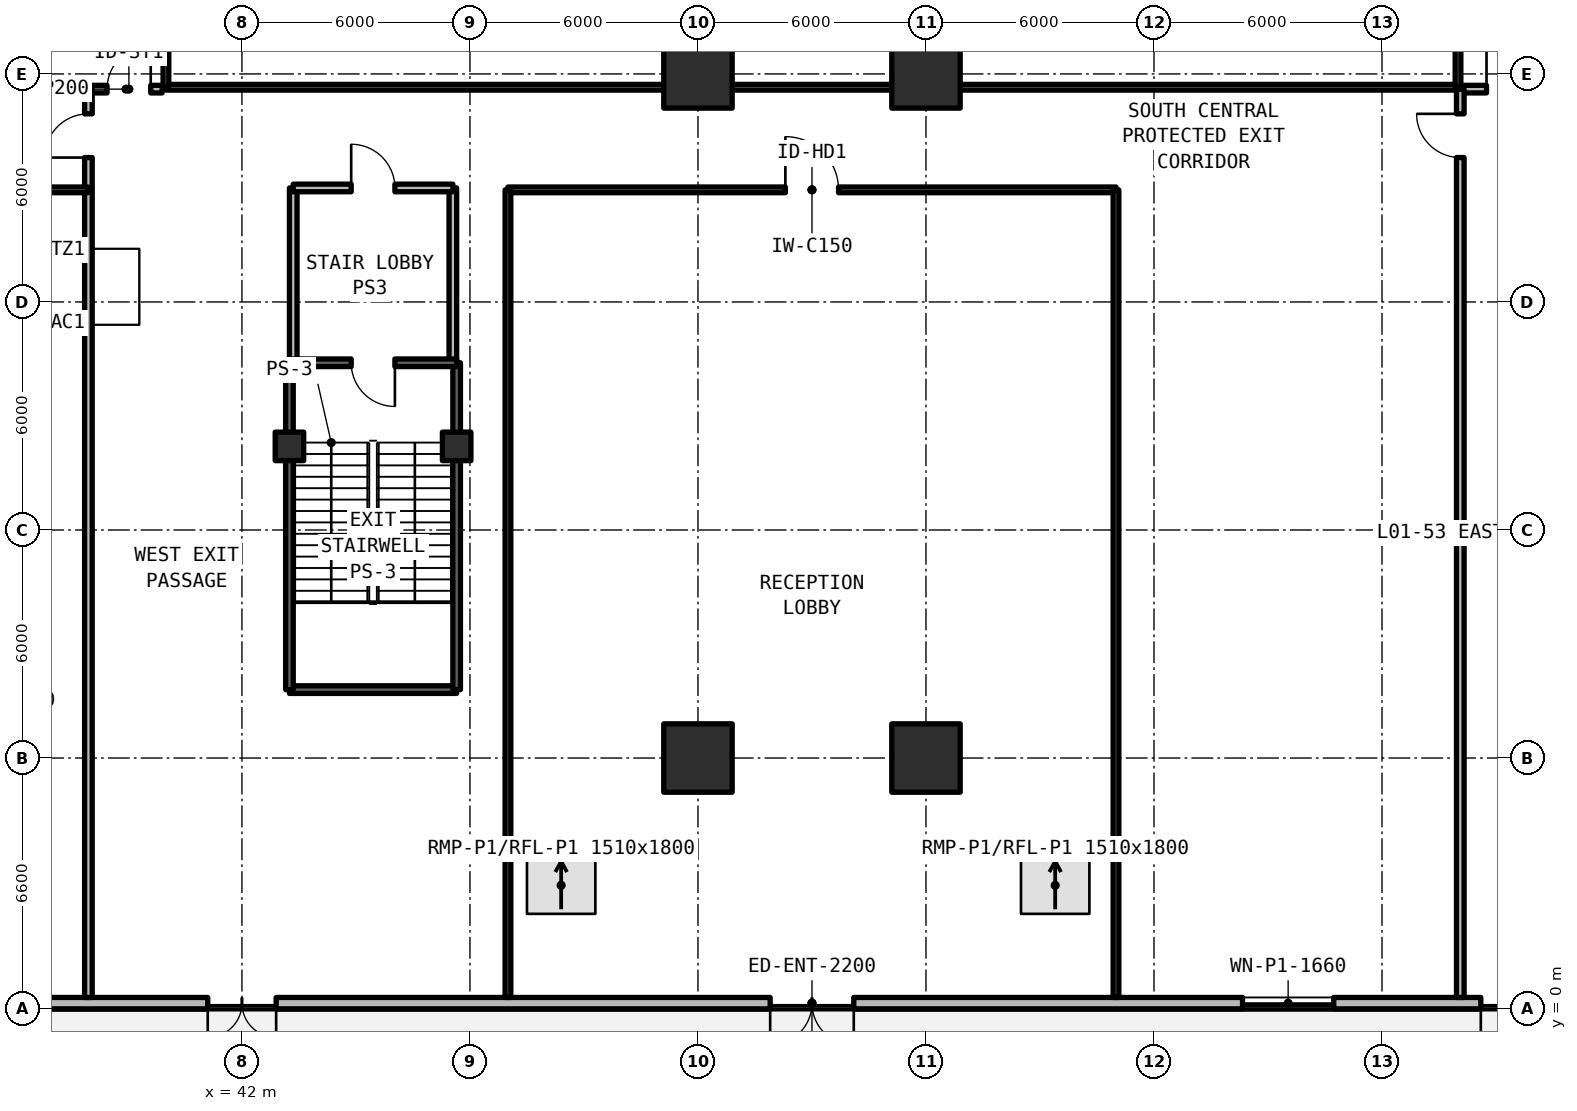
"""IFC4 building model, lengths in metres.
Left out: names, types, materials, properties, quantities, classifications, styles, units other than length and angle.
Written with IfcOpenShell. Run it as: python <this file> out.ifc"""

import sys

from ifc_helpers import new_model, si_unit, direction, frame, frame_2d, origin, origin_2d, place, context, subcontext, project, spatial, rectangle, extrude, element, fill, save


model = new_model("IFC4")
c1 = context("Model", 3, precision=1e-05, world=origin(), true_north=direction((0.0, 1.0)))
c2 = subcontext(c1, "Body", "Model", "MODEL_VIEW")
j1 = project(units=[si_unit("LENGTHUNIT", "METRE"), si_unit("PLANEANGLEUNIT", "RADIAN")], contexts=[c1])
p1 = place(None, origin())
s1 = spatial("IfcSite", under=j1, at=p1, CompositionType="ELEMENT")
p2 = place(p1, origin())
s2 = spatial("IfcBuilding", under=s1, at=p2, CompositionType="ELEMENT")
p3 = place(p2, origin())
s3 = spatial("IfcBuildingStorey", under=s2, at=p3, CompositionType="ELEMENT", Elevation=0.0)
for number, where, z_axis, x_axis in (
    (1, (54.0, 6.6, 0.0), (0.0, 0.0, 1.0), (1.0, 0.0, 0.0)),
    (2, (54.0, 24.6, 0.0), (0.0, 0.0, 1.0), (1.0, 0.0, 0.0)),
    (3, (60.0, 6.6, 0.0), (0.0, 0.0, 1.0), (1.0, 0.0, 0.0)),
    (4, (60.0, 24.6, 0.0), (0.0, 0.0, 1.0), (1.0, 0.0, 0.0)),
):
    element("IfcColumn", number, at=place(p3, frame(where, z_axis=z_axis, x_axis=x_axis)), inside=s3, PredefinedType="COLUMN", context=c2, shape_type="SweptSolid", body=[
        extrude(rectangle(XDim=1.8, YDim=1.8, at=origin_2d()), origin(), (0.0, 0.0, 1.0), 4.95),
    ])
for number, where, z_axis, x_axis in (
    (5, (43.25, 14.8, 0.0), (0.0, 0.0, 1.0), (1.0, 0.0, 0.0)),
    (6, (47.65, 14.8, 0.0), (0.0, 0.0, 1.0), (1.0, 0.0, 0.0)),
):
    element("IfcColumn", number, at=place(p3, frame(where, z_axis=z_axis, x_axis=x_axis)), inside=s3, PredefinedType="COLUMN", context=c2, shape_type="SweptSolid", body=[
        extrude(rectangle(XDim=0.75, YDim=0.75, at=origin_2d()), origin(), (0.0, 0.0, 1.0), 4.95),
    ])
p4 = place(p3, frame((0.15, 0.15, 0.0), z_axis=(0.0, 0.0, 1.0), x_axis=(1.0, 0.0, 0.0)))
e7 = element("IfcWall", 7, at=p4, inside=s3, PredefinedType="SOLIDWALL", context=c2, shape_type="SweptSolid", body=[
    extrude(rectangle(XDim=113.7, YDim=0.3, at=frame_2d((56.85, 0.0))), origin(), (0.0, 0.0, 1.0), 4.67),
])
p5 = place(p4, frame((5.75, 0.0, 0.0)))
e8 = element("IfcOpeningElement", 8, at=p5, cuts=e7, PredefinedType="OPENING", context=c2, shape_type="SweptSolid", body=[
    extrude(rectangle(XDim=1.2, YDim=2.2, at=frame_2d((0.6, 1.1))), frame((0.0, 0.16, 0.0), z_axis=(0.0, -1.0, 0.0), x_axis=(1.0, 0.0, 0.0)), (0.0, 0.0, 1.0), 0.32),
])
p6 = place(p4, frame((17.05, 0.0, 0.0)))
e9 = element("IfcOpeningElement", 9, at=p6, cuts=e7, PredefinedType="OPENING", context=c2, shape_type="SweptSolid", body=[
    extrude(rectangle(XDim=4.2, YDim=3.2, at=frame_2d((2.1, 1.6))), frame((0.0, 0.16, 0.0), z_axis=(0.0, -1.0, 0.0), x_axis=(1.0, 0.0, 0.0)), (0.0, 0.0, 1.0), 0.32),
])
p7 = place(p4, frame((30.7, 0.0, 0.0)))
e10 = element("IfcOpeningElement", 10, at=p7, cuts=e7, PredefinedType="OPENING", context=c2, shape_type="SweptSolid", body=[
    extrude(rectangle(XDim=1.8, YDim=2.25, at=frame_2d((0.9, 1.125))), frame((0.0, 0.16, 0.0), z_axis=(0.0, -1.0, 0.0), x_axis=(1.0, 0.0, 0.0)), (0.0, 0.0, 1.0), 0.32),
])
p8 = place(p4, frame((40.95, 0.0, 0.0)))
e11 = element("IfcOpeningElement", 11, at=p8, cuts=e7, PredefinedType="OPENING", context=c2, shape_type="SweptSolid", body=[
    extrude(rectangle(XDim=1.8, YDim=2.25, at=frame_2d((0.9, 1.125))), frame((0.0, 0.16, 0.0), z_axis=(0.0, -1.0, 0.0), x_axis=(1.0, 0.0, 0.0)), (0.0, 0.0, 1.0), 0.32),
])
p9 = place(p4, frame((55.75, 0.0, 0.0)))
e12 = element("IfcOpeningElement", 12, at=p9, cuts=e7, PredefinedType="OPENING", context=c2, shape_type="SweptSolid", body=[
    extrude(rectangle(XDim=2.2, YDim=2.6, at=frame_2d((1.1, 1.3))), frame((0.0, 0.16, 0.0), z_axis=(0.0, -1.0, 0.0), x_axis=(1.0, 0.0, 0.0)), (0.0, 0.0, 1.0), 0.32),
])
p10 = place(p4, frame((74.45, 0.0, 0.0)))
e13 = element("IfcOpeningElement", 13, at=p10, cuts=e7, PredefinedType="OPENING", context=c2, shape_type="SweptSolid", body=[
    extrude(rectangle(XDim=1.8, YDim=2.25, at=frame_2d((0.9, 1.125))), frame((0.0, 0.16, 0.0), z_axis=(0.0, -1.0, 0.0), x_axis=(1.0, 0.0, 0.0)), (0.0, 0.0, 1.0), 0.32),
])
p11 = place(p4, frame((106.25, 0.0, 0.0)))
e14 = element("IfcOpeningElement", 14, at=p11, cuts=e7, PredefinedType="OPENING", context=c2, shape_type="SweptSolid", body=[
    extrude(rectangle(XDim=1.2, YDim=2.2, at=frame_2d((0.6, 1.1))), frame((0.0, 0.16, 0.0), z_axis=(0.0, -1.0, 0.0), x_axis=(1.0, 0.0, 0.0)), (0.0, 0.0, 1.0), 0.32),
])
p12 = place(p4, frame((68.18, 0.0, 0.78)))
e15 = element("IfcOpeningElement", 15, at=p12, cuts=e7, PredefinedType="OPENING", context=c2, shape_type="SweptSolid", body=[
    extrude(rectangle(XDim=2.4, YDim=1.66, at=frame_2d((1.2, 0.83))), frame((0.0, 0.16, 0.0), z_axis=(0.0, -1.0, 0.0), x_axis=(1.0, 0.0, 0.0)), (0.0, 0.0, 1.0), 0.32),
])
p13 = place(p4, frame((8.15, 0.0, 0.78)))
e16 = element("IfcOpeningElement", 16, at=p13, cuts=e7, PredefinedType="OPENING", context=c2, shape_type="SweptSolid", body=[
    extrude(rectangle(XDim=2.4, YDim=1.66, at=frame_2d((1.2, 0.83))), frame((0.0, 0.16, 0.0), z_axis=(0.0, -1.0, 0.0), x_axis=(1.0, 0.0, 0.0)), (0.0, 0.0, 1.0), 0.32),
])
p14 = place(p4, frame((84.15, 0.0, 0.78)))
e17 = element("IfcOpeningElement", 17, at=p14, cuts=e7, PredefinedType="OPENING", context=c2, shape_type="SweptSolid", body=[
    extrude(rectangle(XDim=2.4, YDim=1.66, at=frame_2d((1.2, 0.83))), frame((0.0, 0.16, 0.0), z_axis=(0.0, -1.0, 0.0), x_axis=(1.0, 0.0, 0.0)), (0.0, 0.0, 1.0), 0.32),
])
p15 = place(p4, frame((93.65, 0.0, 0.78)))
e18 = element("IfcOpeningElement", 18, at=p15, cuts=e7, PredefinedType="OPENING", context=c2, shape_type="SweptSolid", body=[
    extrude(rectangle(XDim=2.4, YDim=1.66, at=frame_2d((1.2, 0.83))), frame((0.0, 0.16, 0.0), z_axis=(0.0, -1.0, 0.0), x_axis=(1.0, 0.0, 0.0)), (0.0, 0.0, 1.0), 0.32),
])
p16 = place(p4, frame((103.15, 0.0, 0.78)))
e19 = element("IfcOpeningElement", 19, at=p16, cuts=e7, PredefinedType="OPENING", context=c2, shape_type="SweptSolid", body=[
    extrude(rectangle(XDim=2.4, YDim=1.66, at=frame_2d((1.2, 0.83))), frame((0.0, 0.16, 0.0), z_axis=(0.0, -1.0, 0.0), x_axis=(1.0, 0.0, 0.0)), (0.0, 0.0, 1.0), 0.32),
])
p17 = place(p3, frame((38.0, 24.2, 0.0), z_axis=(0.0, 0.0, 1.0), x_axis=(1.0, 0.0, 0.0)))
e20 = element("IfcWall", 20, at=p17, inside=s3, PredefinedType="SOLIDWALL", context=c2, shape_type="SweptSolid", body=[
    extrude(rectangle(XDim=1.9, YDim=0.2, at=frame_2d((0.95, 0.0))), origin(), (0.0, 0.0, 1.0), 3.89),
])
p18 = place(p17, frame((0.45, 0.0, 0.0)))
e21 = element("IfcOpeningElement", 21, at=p18, cuts=e20, PredefinedType="OPENING", context=c2, shape_type="SweptSolid", body=[
    extrude(rectangle(XDim=1.15, YDim=2.15, at=frame_2d((0.575, 1.075))), frame((0.0, 0.11, 0.0), z_axis=(0.0, -1.0, 0.0), x_axis=(1.0, 0.0, 0.0)), (0.0, 0.0, 1.0), 0.22),
])
p19 = place(p3, frame((74.1, 24.2, 0.0), z_axis=(0.0, 0.0, 1.0), x_axis=(1.0, 0.0, 0.0)))
e22 = element("IfcWall", 22, at=p19, inside=s3, PredefinedType="SOLIDWALL", context=c2, shape_type="SweptSolid", body=[
    extrude(rectangle(XDim=2.85, YDim=0.2, at=frame_2d((1.425, 0.0))), origin(), (0.0, 0.0, 1.0), 3.89),
])
p20 = place(p19, frame((0.65, 0.0, 0.0)))
e23 = element("IfcOpeningElement", 23, at=p20, cuts=e22, PredefinedType="OPENING", context=c2, shape_type="SweptSolid", body=[
    extrude(rectangle(XDim=1.15, YDim=2.15, at=frame_2d((0.575, 1.075))), frame((0.0, 0.11, 0.0), z_axis=(0.0, -1.0, 0.0), x_axis=(1.0, 0.0, 0.0)), (0.0, 0.0, 1.0), 0.22),
])
for number, where, z_axis, x_axis in (
    (24, (43.35, 17.0, 0.0), (0.0, 0.0, 1.0), (0.0, 1.0, 0.0)),
    (25, (47.55, 17.0, 0.0), (0.0, 0.0, 1.0), (0.0, 1.0, 0.0)),
):
    element("IfcWall", number, at=place(p3, frame(where, z_axis=z_axis, x_axis=x_axis)), inside=s3, PredefinedType="SOLIDWALL", context=c2, shape_type="SweptSolid", body=[
        extrude(rectangle(XDim=4.6, YDim=0.2, at=frame_2d((2.3, 0.0))), origin(), (0.0, 0.0, 1.0), 3.89),
    ])
p21 = place(p3, frame((43.35, 21.6, 0.0), z_axis=(0.0, 0.0, 1.0), x_axis=(1.0, 0.0, 0.0)))
e26 = element("IfcWall", 26, at=p21, inside=s3, PredefinedType="SOLIDWALL", context=c2, shape_type="SweptSolid", body=[
    extrude(rectangle(XDim=4.2, YDim=0.2, at=frame_2d((2.1, 0.0))), origin(), (0.0, 0.0, 1.0), 3.89),
])
p22 = place(p21, frame((1.525, 0.0, 0.0)))
e27 = element("IfcOpeningElement", 27, at=p22, cuts=e26, PredefinedType="OPENING", context=c2, shape_type="SweptSolid", body=[
    extrude(rectangle(XDim=1.15, YDim=2.15, at=frame_2d((0.575, 1.075))), frame((0.0, 0.11, 0.0), z_axis=(0.0, -1.0, 0.0), x_axis=(1.0, 0.0, 0.0)), (0.0, 0.0, 1.0), 0.22),
])
p23 = place(p3, frame((49.0, 21.55, 0.0), z_axis=(0.0, 0.0, 1.0), x_axis=(1.0, 0.0, 0.0)))
e28 = element("IfcWall", 28, at=p23, inside=s3, PredefinedType="SOLIDWALL", context=c2, shape_type="SweptSolid", body=[
    extrude(rectangle(XDim=16.0, YDim=0.15, at=frame_2d((8.0, 0.0))), origin(), (0.0, 0.0, 1.0), 3.89),
])
p24 = place(p23, frame((7.3, 0.0, 0.0)))
e29 = element("IfcOpeningElement", 29, at=p24, cuts=e28, PredefinedType="OPENING", context=c2, shape_type="SweptSolid", body=[
    extrude(rectangle(XDim=1.4, YDim=2.15, at=frame_2d((0.7, 1.075))), frame((0.0, 0.085, 0.0), z_axis=(0.0, -1.0, 0.0), x_axis=(1.0, 0.0, 0.0)), (0.0, 0.0, 1.0), 0.17),
])
for number, where, z_axis, x_axis in (
    (30, (49.0, 0.3, 0.0), (0.0, 0.0, 1.0), (0.0, 1.0, 0.0)),
    (31, (65.0, 0.3, 0.0), (0.0, 0.0, 1.0), (0.0, 1.0, 0.0)),
):
    element("IfcWall", number, at=place(p3, frame(where, z_axis=z_axis, x_axis=x_axis)), inside=s3, PredefinedType="SOLIDWALL", context=c2, shape_type="SweptSolid", body=[
        extrude(rectangle(XDim=21.25, YDim=0.15, at=frame_2d((10.625, 0.0))), origin(), (0.0, 0.0, 1.0), 3.89),
    ])
p25 = place(p3, frame((37.96, 0.3, 0.0), z_axis=(0.0, 0.0, 1.0), x_axis=(0.0, 1.0, 0.0)))
e32 = element("IfcWall", 32, at=p25, inside=s3, PredefinedType="SOLIDWALL", context=c2, shape_type="SweptSolid", body=[
    extrude(rectangle(XDim=23.9, YDim=0.2, at=frame_2d((11.95, 0.0))), origin(), (0.0, 0.0, 1.0), 3.89),
])
p26 = place(p25, frame((22.1, 0.0, 0.0)))
e33 = element("IfcOpeningElement", 33, at=p26, cuts=e32, PredefinedType="OPENING", context=c2, shape_type="SweptSolid", body=[
    extrude(rectangle(XDim=1.15, YDim=2.15, at=frame_2d((0.575, 1.075))), frame((0.0, 0.11, 0.0), z_axis=(0.0, -1.0, 0.0), x_axis=(1.0, 0.0, 0.0)), (0.0, 0.0, 1.0), 0.22),
])
p27 = place(p3, frame((74.06, 0.3, 0.0), z_axis=(0.0, 0.0, 1.0), x_axis=(0.0, 1.0, 0.0)))
e34 = element("IfcWall", 34, at=p27, inside=s3, PredefinedType="SOLIDWALL", context=c2, shape_type="SweptSolid", body=[
    extrude(rectangle(XDim=23.9, YDim=0.2, at=frame_2d((11.95, 0.0))), origin(), (0.0, 0.0, 1.0), 3.89),
])
p28 = place(p27, frame((22.1, 0.0, 0.0)))
e35 = element("IfcOpeningElement", 35, at=p28, cuts=e34, PredefinedType="OPENING", context=c2, shape_type="SweptSolid", body=[
    extrude(rectangle(XDim=1.15, YDim=2.15, at=frame_2d((0.575, 1.075))), frame((0.0, 0.11, 0.0), z_axis=(0.0, -1.0, 0.0), x_axis=(1.0, 0.0, 0.0)), (0.0, 0.0, 1.0), 0.22),
])
p29 = place(p3, frame((40.0, 24.25, 0.0), z_axis=(0.0, 0.0, 1.0), x_axis=(1.0, 0.0, 0.0)))
e36 = element("IfcWall", 36, at=p29, inside=s3, PredefinedType="SOLIDWALL", context=c2, shape_type="SweptSolid", body=[
    extrude(rectangle(XDim=34.0, YDim=0.15, at=frame_2d((17.0, 0.0))), origin(), (0.0, 0.0, 1.0), 3.89),
])
p30 = place(p3, frame((40.0, 24.25, 0.0), z_axis=(0.0, 0.0, 1.0), x_axis=(0.0, 1.0, 0.0)))
e37 = element("IfcWall", 37, at=p30, inside=s3, PredefinedType="SOLIDWALL", context=c2, shape_type="SweptSolid", body=[
    extrude(rectangle(XDim=18.7, YDim=0.15, at=frame_2d((9.35, 0.0))), origin(), (0.0, 0.0, 1.0), 3.89),
])
p31 = place(p30, frame((8.3, 0.0, 0.0)))
e38 = element("IfcOpeningElement", 38, at=p31, cuts=e37, PredefinedType="OPENING", context=c2, shape_type="SweptSolid", body=[
    extrude(rectangle(XDim=1.4, YDim=2.15, at=frame_2d((0.7, 1.075))), frame((0.0, 0.085, 0.0), z_axis=(0.0, -1.0, 0.0), x_axis=(1.0, 0.0, 0.0)), (0.0, 0.0, 1.0), 0.17),
])
p32 = place(p3, frame((74.0, 24.25, 0.0), z_axis=(0.0, 0.0, 1.0), x_axis=(0.0, 1.0, 0.0)))
e39 = element("IfcWall", 39, at=p32, inside=s3, PredefinedType="SOLIDWALL", context=c2, shape_type="SweptSolid", body=[
    extrude(rectangle(XDim=18.7, YDim=0.15, at=frame_2d((9.35, 0.0))), origin(), (0.0, 0.0, 1.0), 3.89),
])
p33 = place(p3, frame((30.15, 21.55, 0.0), z_axis=(0.0, 0.0, 1.0), x_axis=(1.0, 0.0, 0.0)))
e40 = element("IfcWall", 40, at=p33, inside=s3, PredefinedType="SOLIDWALL", context=c2, shape_type="SweptSolid", body=[
    extrude(rectangle(XDim=7.8, YDim=0.15, at=frame_2d((3.9, 0.0))), origin(), (0.0, 0.0, 1.0), 3.89),
])
p34 = place(p33, frame((3.35, 0.0, 0.0)))
e41 = element("IfcOpeningElement", 41, at=p34, cuts=e40, PredefinedType="OPENING", context=c2, shape_type="SweptSolid", body=[
    extrude(rectangle(XDim=1.1, YDim=2.15, at=frame_2d((0.55, 1.075))), frame((0.0, 0.085, 0.0), z_axis=(0.0, -1.0, 0.0), x_axis=(1.0, 0.0, 0.0)), (0.0, 0.0, 1.0), 0.17),
])
p35 = place(p3, frame((43.25, 8.4, 0.0), z_axis=(0.0, 0.0, 1.0), x_axis=(1.0, 0.0, 0.0)))
e42 = element("IfcWall", 42, at=p35, inside=s3, PredefinedType="SOLIDWALL", context=c2, shape_type="SweptSolid", body=[
    extrude(rectangle(XDim=4.4, YDim=0.2, at=frame_2d((2.2, 0.0))), origin(), (0.0, 0.0, 1.0), 4.95),
])
p36 = place(p3, frame((47.65, 8.4, 0.0), z_axis=(0.0, 0.0, 1.0), x_axis=(0.0, 1.0, 0.0)))
e43 = element("IfcWall", 43, at=p36, inside=s3, PredefinedType="SOLIDWALL", context=c2, shape_type="SweptSolid", body=[
    extrude(rectangle(XDim=8.6, YDim=0.2, at=frame_2d((4.3, 0.0))), origin(), (0.0, 0.0, 1.0), 4.95),
])
p37 = place(p3, frame((47.65, 17.0, 0.0), z_axis=(0.0, 0.0, 1.0), x_axis=(-1.0, 0.0, 0.0)))
e44 = element("IfcWall", 44, at=p37, inside=s3, PredefinedType="SOLIDWALL", context=c2, shape_type="SweptSolid", body=[
    extrude(rectangle(XDim=4.4, YDim=0.2, at=frame_2d((2.2, 0.0))), origin(), (0.0, 0.0, 1.0), 4.95),
])
p38 = place(p37, frame((1.625, 0.0, 0.0)))
e45 = element("IfcOpeningElement", 45, at=p38, cuts=e44, PredefinedType="OPENING", context=c2, shape_type="SweptSolid", body=[
    extrude(rectangle(XDim=1.15, YDim=2.15, at=frame_2d((0.575, 1.075))), frame((0.0, 0.11, 0.0), z_axis=(0.0, -1.0, 0.0), x_axis=(1.0, 0.0, 0.0)), (0.0, 0.0, 1.0), 0.22),
])
p39 = place(p3, frame((43.25, 17.0, 0.0), z_axis=(0.0, 0.0, 1.0), x_axis=(0.0, -1.0, 0.0)))
e46 = element("IfcWall", 46, at=p39, inside=s3, PredefinedType="SOLIDWALL", context=c2, shape_type="SweptSolid", body=[
    extrude(rectangle(XDim=8.6, YDim=0.2, at=frame_2d((4.3, 0.0))), origin(), (0.0, 0.0, 1.0), 4.95),
])
p40 = place(p8, frame((1.8, 0.0, 0.0), z_axis=(0.0, 0.0, 1.0), x_axis=(-1.0, 0.0, 0.0)))
e47 = element("IfcDoor", 47, at=p40, inside=s3, OperationType="SINGLE_SWING_LEFT", PredefinedType="DOOR", context=c2, shape_type="SweptSolid", body=[
    extrude(rectangle(XDim=1.8, YDim=2.25, at=frame_2d((0.9, 1.125))), frame((0.0, 0.025, 0.0), z_axis=(0.0, -1.0, 0.0), x_axis=(1.0, 0.0, 0.0)), (0.0, 0.0, 1.0), 0.05),
])
fill(e11, e47)
p41 = place(p9, frame((2.2, 0.0, 0.0), z_axis=(0.0, 0.0, 1.0), x_axis=(-1.0, 0.0, 0.0)))
e48 = element("IfcDoor", 48, at=p41, inside=s3, OperationType="SINGLE_SWING_RIGHT", PredefinedType="DOOR", context=c2, shape_type="SweptSolid", body=[
    extrude(rectangle(XDim=2.2, YDim=2.6, at=frame_2d((1.1, 1.3))), frame((0.0, 0.025, 0.0), z_axis=(0.0, -1.0, 0.0), x_axis=(1.0, 0.0, 0.0)), (0.0, 0.0, 1.0), 0.05),
])
fill(e12, e48)
p42 = place(p10, frame((1.8, 0.0, 0.0), z_axis=(0.0, 0.0, 1.0), x_axis=(-1.0, 0.0, 0.0)))
e49 = element("IfcDoor", 49, at=p42, inside=s3, OperationType="SINGLE_SWING_LEFT", PredefinedType="DOOR", context=c2, shape_type="SweptSolid", body=[
    extrude(rectangle(XDim=1.8, YDim=2.25, at=frame_2d((0.9, 1.125))), frame((0.0, 0.025, 0.0), z_axis=(0.0, -1.0, 0.0), x_axis=(1.0, 0.0, 0.0)), (0.0, 0.0, 1.0), 0.05),
])
fill(e13, e49)
p43 = place(p12, origin())
e50 = element("IfcWindow", 50, at=p43, inside=s3, PartitioningType="SINGLE_PANEL", PredefinedType="WINDOW", context=c2, shape_type="SweptSolid", body=[
    extrude(rectangle(XDim=2.4, YDim=1.66, at=frame_2d((1.2, 0.83))), frame((0.0, 0.03, 0.0), z_axis=(0.0, -1.0, 0.0), x_axis=(1.0, 0.0, 0.0)), (0.0, 0.0, 1.0), 0.06),
])
fill(e15, e50)
p44 = place(p18, frame((1.15, 0.0, 0.0), z_axis=(0.0, 0.0, 1.0), x_axis=(-1.0, 0.0, 0.0)))
e51 = element("IfcDoor", 51, at=p44, inside=s3, OperationType="SINGLE_SWING_RIGHT", PredefinedType="DOOR", context=c2, shape_type="SweptSolid", body=[
    extrude(rectangle(XDim=1.15, YDim=2.15, at=frame_2d((0.575, 1.075))), frame((0.0, 0.025, 0.0), z_axis=(0.0, -1.0, 0.0), x_axis=(1.0, 0.0, 0.0)), (0.0, 0.0, 1.0), 0.05),
])
fill(e21, e51)
p45 = place(p20, frame((1.15, 0.0, 0.0), z_axis=(0.0, 0.0, 1.0), x_axis=(-1.0, 0.0, 0.0)))
e52 = element("IfcDoor", 52, at=p45, inside=s3, OperationType="SINGLE_SWING_LEFT", PredefinedType="DOOR", context=c2, shape_type="SweptSolid", body=[
    extrude(rectangle(XDim=1.15, YDim=2.15, at=frame_2d((0.575, 1.075))), frame((0.0, 0.025, 0.0), z_axis=(0.0, -1.0, 0.0), x_axis=(1.0, 0.0, 0.0)), (0.0, 0.0, 1.0), 0.05),
])
fill(e23, e52)
p46 = place(p22, origin())
e53 = element("IfcDoor", 53, at=p46, inside=s3, OperationType="SINGLE_SWING_LEFT", PredefinedType="DOOR", context=c2, shape_type="SweptSolid", body=[
    extrude(rectangle(XDim=1.15, YDim=2.15, at=frame_2d((0.575, 1.075))), frame((0.0, 0.025, 0.0), z_axis=(0.0, -1.0, 0.0), x_axis=(1.0, 0.0, 0.0)), (0.0, 0.0, 1.0), 0.05),
])
fill(e27, e53)
p47 = place(p24, frame((1.4, 0.0, 0.0), z_axis=(0.0, 0.0, 1.0), x_axis=(-1.0, 0.0, 0.0)))
e54 = element("IfcDoor", 54, at=p47, inside=s3, OperationType="SINGLE_SWING_RIGHT", PredefinedType="DOOR", context=c2, shape_type="SweptSolid", body=[
    extrude(rectangle(XDim=1.4, YDim=2.15, at=frame_2d((0.7, 1.075))), frame((0.0, 0.025, 0.0), z_axis=(0.0, -1.0, 0.0), x_axis=(1.0, 0.0, 0.0)), (0.0, 0.0, 1.0), 0.05),
])
fill(e29, e54)
p48 = place(p26, frame((1.15, 0.0, 0.0), z_axis=(0.0, 0.0, 1.0), x_axis=(-1.0, 0.0, 0.0)))
e55 = element("IfcDoor", 55, at=p48, inside=s3, OperationType="SINGLE_SWING_LEFT", PredefinedType="DOOR", context=c2, shape_type="SweptSolid", body=[
    extrude(rectangle(XDim=1.15, YDim=2.15, at=frame_2d((0.575, 1.075))), frame((0.0, 0.025, 0.0), z_axis=(0.0, -1.0, 0.0), x_axis=(1.0, 0.0, 0.0)), (0.0, 0.0, 1.0), 0.05),
])
fill(e33, e55)
p49 = place(p28, frame((1.15, 0.0, 0.0), z_axis=(0.0, 0.0, 1.0), x_axis=(-1.0, 0.0, 0.0)))
e56 = element("IfcDoor", 56, at=p49, inside=s3, OperationType="SINGLE_SWING_RIGHT", PredefinedType="DOOR", context=c2, shape_type="SweptSolid", body=[
    extrude(rectangle(XDim=1.15, YDim=2.15, at=frame_2d((0.575, 1.075))), frame((0.0, 0.025, 0.0), z_axis=(0.0, -1.0, 0.0), x_axis=(1.0, 0.0, 0.0)), (0.0, 0.0, 1.0), 0.05),
])
fill(e35, e56)
p50 = place(p38, frame((1.15, 0.0, 0.0), z_axis=(0.0, 0.0, 1.0), x_axis=(-1.0, 0.0, 0.0)))
e57 = element("IfcDoor", 57, at=p50, inside=s3, OperationType="SINGLE_SWING_LEFT", PredefinedType="DOOR", context=c2, shape_type="SweptSolid", body=[
    extrude(rectangle(XDim=1.15, YDim=2.15, at=frame_2d((0.575, 1.075))), frame((0.0, 0.025, 0.0), z_axis=(0.0, -1.0, 0.0), x_axis=(1.0, 0.0, 0.0)), (0.0, 0.0, 1.0), 0.05),
])
fill(e45, e57)
save(model, sys.argv[1])
